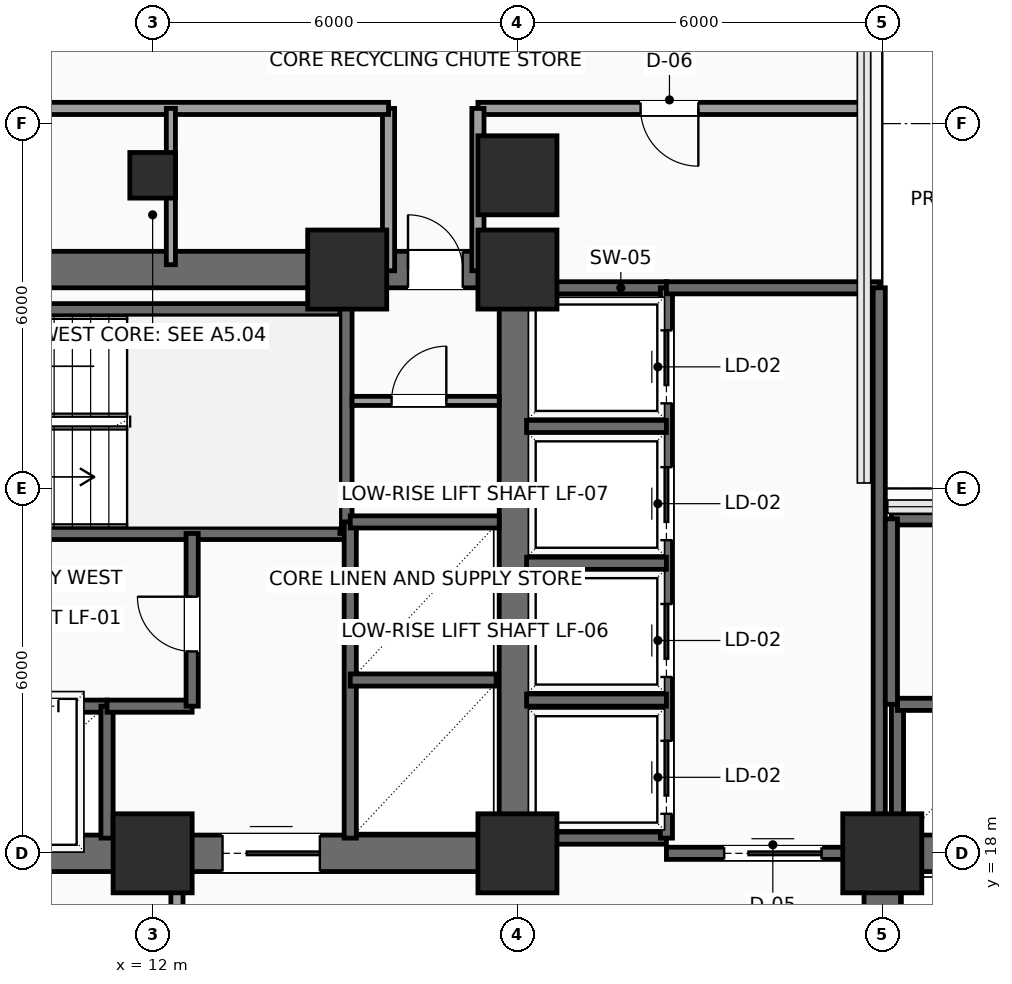
"""IFC4 building model, lengths in metres.
Left out: names, types, materials, properties, quantities, classifications, styles, units other than length and angle.
Written with IfcOpenShell. Run it as: python <this file> out.ifc"""

import sys

from ifc_helpers import new_model, si_unit, direction, frame, frame_2d, origin, origin_2d, place, context, subcontext, project, spatial, rectangle, hollow_rectangle, extrude, element, fill, save


model = new_model("IFC4")
c1 = context("Model", 3, precision=1e-05, world=origin(), true_north=direction((0.0, 1.0)))
c2 = subcontext(c1, "Body", "Model", "MODEL_VIEW")
j1 = project(units=[si_unit("LENGTHUNIT", "METRE"), si_unit("PLANEANGLEUNIT", "RADIAN")], contexts=[c1])
p1 = place(None, origin())
s1 = spatial("IfcSite", under=j1, at=p1, CompositionType="ELEMENT")
p2 = place(p1, origin())
s2 = spatial("IfcBuilding", under=s1, at=p2, CompositionType="ELEMENT")
p3 = place(p2, frame((0.0, 0.0, 63.6)))
s3 = spatial("IfcBuildingStorey", under=s2, at=p3, CompositionType="ELEMENT", Elevation=63.6)
for number, where, z_axis, x_axis in (
    (1, (12.0, 18.0, 0.0), (0.0, 0.0, 1.0), (1.0, 0.0, 0.0)),
    (2, (18.0, 18.0, 0.0), (0.0, 0.0, 1.0), (1.0, 0.0, 0.0)),
    (3, (15.2, 27.6, 0.0), (0.0, 0.0, 1.0), (1.0, 0.0, 0.0)),
    (4, (18.0, 27.6, 0.0), (0.0, 0.0, 1.0), (1.0, 0.0, 0.0)),
    (5, (24.0, 18.0, 0.0), (0.0, 0.0, 1.0), (1.0, 0.0, 0.0)),
):
    element("IfcColumn", number, at=place(p3, frame(where, z_axis=z_axis, x_axis=x_axis)), inside=s3, PredefinedType="COLUMN", context=c2, shape_type="SweptSolid", body=[
        extrude(rectangle(XDim=1.3, YDim=1.3, at=origin_2d()), origin(), (0.0, 0.0, 1.0), 3.9),
    ])
p4 = place(p3, frame((12.0, 29.15, 0.0), z_axis=(0.0, 0.0, 1.0), x_axis=(1.0, 0.0, 0.0)))
e6 = element("IfcColumn", 6, at=p4, inside=s3, PredefinedType="COLUMN", context=c2, shape_type="SweptSolid", body=[
    extrude(hollow_rectangle(XDim=0.75, YDim=0.75, WallThickness=0.035, InnerFilletRadius=0.035, OuterFilletRadius=0.05, at=origin_2d()), origin(), (0.0, 0.0, 1.0), 3.9),
])
p5 = place(p3, frame((18.0, 29.15, 0.0), z_axis=(0.0, 0.0, 1.0), x_axis=(1.0, 0.0, 0.0)))
e7 = element("IfcColumn", 7, at=p5, inside=s3, PredefinedType="COLUMN", context=c2, shape_type="SweptSolid", body=[
    extrude(rectangle(XDim=1.3, YDim=1.3, at=origin_2d()), origin(), (0.0, 0.0, 1.0), 3.9),
])
p6 = place(p3, frame((6.0, 18.0, 0.0), z_axis=(0.0, 0.0, 1.0), x_axis=(1.0, 0.0, 0.0)))
e8 = element("IfcWall", 8, at=p6, inside=s3, PredefinedType="SHEAR", context=c2, shape_type="SweptSolid", body=[
    extrude(rectangle(XDim=12.0, YDim=0.6, at=frame_2d((6.0, 0.0))), origin(), (0.0, 0.0, 1.0), 3.65),
])
p7 = place(p6, frame((7.15, 0.0, 0.0)))
e9 = element("IfcOpeningElement", 9, at=p7, cuts=e8, PredefinedType="OPENING", context=c2, shape_type="SweptSolid", body=[
    extrude(rectangle(XDim=1.6, YDim=2.3, at=frame_2d((0.8, 1.15))), frame((0.0, 0.31, 0.0), z_axis=(0.0, -1.0, 0.0), x_axis=(1.0, 0.0, 0.0)), (0.0, 0.0, 1.0), 0.62),
])
p8 = place(p3, frame((6.0, 27.6, 0.0), z_axis=(0.0, 0.0, 1.0), x_axis=(1.0, 0.0, 0.0)))
e10 = element("IfcWall", 10, at=p8, inside=s3, PredefinedType="SHEAR", context=c2, shape_type="SweptSolid", body=[
    extrude(rectangle(XDim=12.0, YDim=0.6, at=frame_2d((6.0, 0.0))), origin(), (0.0, 0.0, 1.0), 3.65),
])
p9 = place(p8, frame((10.2, 0.0, 0.0)))
e11 = element("IfcOpeningElement", 11, at=p9, cuts=e10, PredefinedType="OPENING", context=c2, shape_type="SweptSolid", body=[
    extrude(rectangle(XDim=0.9, YDim=2.15, at=frame_2d((0.45, 1.075))), frame((0.0, 0.31, 0.0), z_axis=(0.0, -1.0, 0.0), x_axis=(1.0, 0.0, 0.0)), (0.0, 0.0, 1.0), 0.62),
])
for number, where, z_axis, x_axis in (
    (12, (18.0, 18.0, 0.0), (0.0, 0.0, 1.0), (0.0, 1.0, 0.0)),
    (13, (24.0, 18.0, 0.0), (0.0, 0.0, 1.0), (1.0, 0.0, 0.0)),
):
    element("IfcWall", number, at=place(p3, frame(where, z_axis=z_axis, x_axis=x_axis)), inside=s3, PredefinedType="SHEAR", context=c2, shape_type="SweptSolid", body=[
        extrude(rectangle(XDim=9.6, YDim=0.6, at=frame_2d((4.8, 0.0))), origin(), (0.0, 0.0, 1.0), 3.65),
    ])
p10 = place(p3, frame((24.0, 6.0, 0.0), z_axis=(0.0, 0.0, 1.0), x_axis=(0.0, 1.0, 0.0)))
e14 = element("IfcWall", 14, at=p10, inside=s3, PredefinedType="SHEAR", context=c2, shape_type="SweptSolid", body=[
    extrude(rectangle(XDim=12.0, YDim=0.6, at=frame_2d((6.0, 0.0))), origin(), (0.0, 0.0, 1.0), 3.65),
])
p11 = place(p10, frame((7.15, 0.0, 0.0)))
e15 = element("IfcOpeningElement", 15, at=p11, cuts=e14, PredefinedType="OPENING", context=c2, shape_type="SweptSolid", body=[
    extrude(rectangle(XDim=1.6, YDim=2.3, at=frame_2d((0.8, 1.15))), frame((0.0, 0.31, 0.0), z_axis=(0.0, -1.0, 0.0), x_axis=(1.0, 0.0, 0.0)), (0.0, 0.0, 1.0), 0.62),
])
p12 = place(p3, frame((6.3, 23.26, 0.0), z_axis=(0.0, 0.0, 1.0), x_axis=(1.0, 0.0, 0.0)))
e16 = element("IfcWall", 16, at=p12, inside=s3, PredefinedType="SHEAR", context=c2, shape_type="SweptSolid", body=[
    extrude(rectangle(XDim=8.88, YDim=0.2, at=frame_2d((4.44, 0.0))), origin(), (0.0, 0.0, 1.0), 3.65),
])
p13 = place(p12, frame((0.35, 0.0, 0.0)))
e17 = element("IfcOpeningElement", 17, at=p13, cuts=e16, PredefinedType="OPENING", context=c2, shape_type="SweptSolid", body=[
    extrude(rectangle(XDim=1.1, YDim=2.2, at=frame_2d((0.55, 1.1))), frame((0.0, 0.11, 0.0), z_axis=(0.0, -1.0, 0.0), x_axis=(1.0, 0.0, 0.0)), (0.0, 0.0, 1.0), 0.22),
])
p14 = place(p3, frame((6.3, 26.94, 0.0), z_axis=(0.0, 0.0, 1.0), x_axis=(1.0, 0.0, 0.0)))
e18 = element("IfcWall", 18, at=p14, inside=s3, PredefinedType="SHEAR", context=c2, shape_type="SweptSolid", body=[
    extrude(rectangle(XDim=8.88, YDim=0.2, at=frame_2d((4.44, 0.0))), origin(), (0.0, 0.0, 1.0), 3.65),
])
p15 = place(p3, frame((15.18, 23.26, 0.0), z_axis=(0.0, 0.0, 1.0), x_axis=(0.0, 1.0, 0.0)))
e19 = element("IfcWall", 19, at=p15, inside=s3, PredefinedType="SHEAR", context=c2, shape_type="SweptSolid", body=[
    extrude(rectangle(XDim=4.04, YDim=0.2, at=frame_2d((2.02, 0.0))), origin(), (0.0, 0.0, 1.0), 3.65),
])
p16 = place(p3, frame((6.3, 20.42, 0.0), z_axis=(0.0, 0.0, 1.0), x_axis=(1.0, 0.0, 0.0)))
e20 = element("IfcWall", 20, at=p16, inside=s3, PredefinedType="SHEAR", context=c2, shape_type="SweptSolid", body=[
    extrude(rectangle(XDim=4.95, YDim=0.2, at=frame_2d((2.475, 0.0))), origin(), (0.0, 0.0, 1.0), 3.65),
])
p17 = place(p16, frame((0.65, 0.0, 0.0)))
e21 = element("IfcOpeningElement", 21, at=p17, cuts=e20, PredefinedType="OPENING", context=c2, shape_type="SweptSolid", body=[
    extrude(rectangle(XDim=1.1, YDim=2.2, at=frame_2d((0.55, 1.1))), frame((0.0, 0.11, 0.0), z_axis=(0.0, -1.0, 0.0), x_axis=(1.0, 0.0, 0.0)), (0.0, 0.0, 1.0), 0.22),
])
p18 = place(p16, frame((3.05, 0.0, 0.0)))
e22 = element("IfcOpeningElement", 22, at=p18, cuts=e20, PredefinedType="OPENING", context=c2, shape_type="SweptSolid", body=[
    extrude(rectangle(XDim=1.1, YDim=2.2, at=frame_2d((0.55, 1.1))), frame((0.0, 0.11, 0.0), z_axis=(0.0, -1.0, 0.0), x_axis=(1.0, 0.0, 0.0)), (0.0, 0.0, 1.0), 0.22),
])
p19 = place(p3, frame((11.25, 18.25, 0.0), z_axis=(0.0, 0.0, 1.0), x_axis=(0.0, 1.0, 0.0)))
e23 = element("IfcWall", 23, at=p19, inside=s3, PredefinedType="SHEAR", context=c2, shape_type="SweptSolid", body=[
    extrude(rectangle(XDim=2.17, YDim=0.2, at=frame_2d((1.085, 0.0))), origin(), (0.0, 0.0, 1.0), 3.65),
])
p20 = place(p3, frame((11.25, 20.42, 0.0), z_axis=(0.0, 0.0, 1.0), x_axis=(1.0, 0.0, 0.0)))
e24 = element("IfcWall", 24, at=p20, inside=s3, PredefinedType="SHEAR", context=c2, shape_type="SweptSolid", body=[
    extrude(rectangle(XDim=1.4, YDim=0.2, at=frame_2d((0.7, 0.0))), origin(), (0.0, 0.0, 1.0), 3.65),
])
p21 = place(p3, frame((12.65, 20.42, 0.0), z_axis=(0.0, 0.0, 1.0), x_axis=(0.0, 1.0, 0.0)))
e25 = element("IfcWall", 25, at=p21, inside=s3, PredefinedType="SHEAR", context=c2, shape_type="SweptSolid", body=[
    extrude(rectangle(XDim=2.84, YDim=0.2, at=frame_2d((1.42, 0.0))), origin(), (0.0, 0.0, 1.0), 3.65),
])
p22 = place(p21, frame((0.9, 0.0, 0.0)))
e26 = element("IfcOpeningElement", 26, at=p22, cuts=e25, PredefinedType="OPENING", context=c2, shape_type="SweptSolid", body=[
    extrude(rectangle(XDim=0.9, YDim=2.15, at=frame_2d((0.45, 1.075))), frame((0.0, 0.11, 0.0), z_axis=(0.0, -1.0, 0.0), x_axis=(1.0, 0.0, 0.0)), (0.0, 0.0, 1.0), 0.22),
])
p23 = place(p3, frame((15.25, 18.25, 0.0), z_axis=(0.0, 0.0, 1.0), x_axis=(0.0, 1.0, 0.0)))
e27 = element("IfcWall", 27, at=p23, inside=s3, PredefinedType="SHEAR", context=c2, shape_type="SweptSolid", body=[
    extrude(rectangle(XDim=5.2, YDim=0.2, at=frame_2d((2.6, 0.0))), origin(), (0.0, 0.0, 1.0), 3.65),
])
p24 = place(p3, frame((15.25, 20.85, 0.0), z_axis=(0.0, 0.0, 1.0), x_axis=(1.0, 0.0, 0.0)))
e28 = element("IfcWall", 28, at=p24, inside=s3, PredefinedType="SHEAR", context=c2, shape_type="SweptSolid", body=[
    extrude(rectangle(XDim=2.4, YDim=0.2, at=frame_2d((1.2, 0.0))), origin(), (0.0, 0.0, 1.0), 3.65),
])
p25 = place(p3, frame((15.25, 23.45, 0.0), z_axis=(0.0, 0.0, 1.0), x_axis=(1.0, 0.0, 0.0)))
e29 = element("IfcWall", 29, at=p25, inside=s3, PredefinedType="SHEAR", context=c2, shape_type="SweptSolid", body=[
    extrude(rectangle(XDim=2.45, YDim=0.2, at=frame_2d((1.225, 0.0))), origin(), (0.0, 0.0, 1.0), 3.65),
])
p26 = place(p3, frame((15.28, 25.44, 0.0), z_axis=(0.0, 0.0, 1.0), x_axis=(1.0, 0.0, 0.0)))
e30 = element("IfcWall", 30, at=p26, inside=s3, PredefinedType="PARTITIONING", context=c2, shape_type="SweptSolid", body=[
    extrude(rectangle(XDim=2.42, YDim=0.15, at=frame_2d((1.21, 0.0))), origin(), (0.0, 0.0, 1.0), 3.65),
])
p27 = place(p26, frame((0.65, 0.0, 0.0)))
e31 = element("IfcOpeningElement", 31, at=p27, cuts=e30, PredefinedType="OPENING", context=c2, shape_type="SweptSolid", body=[
    extrude(rectangle(XDim=0.9, YDim=2.15, at=frame_2d((0.45, 1.075))), frame((0.0, 0.085, 0.0), z_axis=(0.0, -1.0, 0.0), x_axis=(1.0, 0.0, 0.0)), (0.0, 0.0, 1.0), 0.17),
])
for number, where, z_axis, x_axis in (
    (32, (18.1, 27.3, 0.0), (0.0, 0.0, 1.0), (1.0, 0.0, 0.0)),
    (33, (18.1, 18.25, 0.0), (0.0, 0.0, 1.0), (1.0, 0.0, 0.0)),
):
    element("IfcWall", number, at=place(p3, frame(where, z_axis=z_axis, x_axis=x_axis)), inside=s3, PredefinedType="SHEAR", context=c2, shape_type="SweptSolid", body=[
        extrude(rectangle(XDim=2.35, YDim=0.2, at=frame_2d((1.175, 0.0))), origin(), (0.0, 0.0, 1.0), 3.65),
    ])
p28 = place(p3, frame((20.45, 18.25, 0.0), z_axis=(0.0, 0.0, 1.0), x_axis=(0.0, 1.0, 0.0)))
e34 = element("IfcWall", 34, at=p28, inside=s3, PredefinedType="SHEAR", context=c2, shape_type="SweptSolid", body=[
    extrude(rectangle(XDim=9.05, YDim=0.2, at=frame_2d((4.525, 0.0))), origin(), (0.0, 0.0, 1.0), 3.65),
])
p29 = place(p28, frame((0.4, 0.0, 0.0)))
e35 = element("IfcOpeningElement", 35, at=p29, cuts=e34, PredefinedType="OPENING", context=c2, shape_type="SweptSolid", body=[
    extrude(rectangle(XDim=1.2, YDim=2.2, at=frame_2d((0.6, 1.1))), frame((0.0, 0.11, 0.0), z_axis=(0.0, -1.0, 0.0), x_axis=(1.0, 0.0, 0.0)), (0.0, 0.0, 1.0), 0.22),
])
p30 = place(p28, frame((2.65, 0.0, 0.0)))
e36 = element("IfcOpeningElement", 36, at=p30, cuts=e34, PredefinedType="OPENING", context=c2, shape_type="SweptSolid", body=[
    extrude(rectangle(XDim=1.2, YDim=2.2, at=frame_2d((0.6, 1.1))), frame((0.0, 0.11, 0.0), z_axis=(0.0, -1.0, 0.0), x_axis=(1.0, 0.0, 0.0)), (0.0, 0.0, 1.0), 0.22),
])
p31 = place(p28, frame((4.9, 0.0, 0.0)))
e37 = element("IfcOpeningElement", 37, at=p31, cuts=e34, PredefinedType="OPENING", context=c2, shape_type="SweptSolid", body=[
    extrude(rectangle(XDim=1.2, YDim=2.2, at=frame_2d((0.6, 1.1))), frame((0.0, 0.11, 0.0), z_axis=(0.0, -1.0, 0.0), x_axis=(1.0, 0.0, 0.0)), (0.0, 0.0, 1.0), 0.22),
])
p32 = place(p28, frame((7.15, 0.0, 0.0)))
e38 = element("IfcOpeningElement", 38, at=p32, cuts=e34, PredefinedType="OPENING", context=c2, shape_type="SweptSolid", body=[
    extrude(rectangle(XDim=1.2, YDim=2.2, at=frame_2d((0.6, 1.1))), frame((0.0, 0.11, 0.0), z_axis=(0.0, -1.0, 0.0), x_axis=(1.0, 0.0, 0.0)), (0.0, 0.0, 1.0), 0.22),
])
for number, where, z_axis, x_axis in (
    (39, (18.15, 20.52, 0.0), (0.0, 0.0, 1.0), (1.0, 0.0, 0.0)),
    (40, (18.15, 22.77, 0.0), (0.0, 0.0, 1.0), (1.0, 0.0, 0.0)),
    (41, (18.15, 25.02, 0.0), (0.0, 0.0, 1.0), (1.0, 0.0, 0.0)),
):
    element("IfcWall", number, at=place(p3, frame(where, z_axis=z_axis, x_axis=x_axis)), inside=s3, PredefinedType="SHEAR", context=c2, shape_type="SweptSolid", body=[
        extrude(rectangle(XDim=2.3, YDim=0.2, at=frame_2d((1.15, 0.0))), origin(), (0.0, 0.0, 1.0), 3.65),
    ])
p33 = place(p3, frame((20.45, 18.0, 0.0), z_axis=(0.0, 0.0, 1.0), x_axis=(1.0, 0.0, 0.0)))
e42 = element("IfcWall", 42, at=p33, inside=s3, PredefinedType="SHEAR", context=c2, shape_type="SweptSolid", body=[
    extrude(rectangle(XDim=3.5, YDim=0.2, at=frame_2d((1.75, 0.0))), origin(), (0.0, 0.0, 1.0), 3.65),
])
p34 = place(p33, frame((0.95, 0.0, 0.0)))
e43 = element("IfcOpeningElement", 43, at=p34, cuts=e42, PredefinedType="OPENING", context=c2, shape_type="SweptSolid", body=[
    extrude(rectangle(XDim=1.6, YDim=2.3, at=frame_2d((0.8, 1.15))), frame((0.0, 0.11, 0.0), z_axis=(0.0, -1.0, 0.0), x_axis=(1.0, 0.0, 0.0)), (0.0, 0.0, 1.0), 0.22),
])
p35 = place(p3, frame((20.45, 27.3, 0.0), z_axis=(0.0, 0.0, 1.0), x_axis=(1.0, 0.0, 0.0)))
e44 = element("IfcWall", 44, at=p35, inside=s3, PredefinedType="SHEAR", context=c2, shape_type="SweptSolid", body=[
    extrude(rectangle(XDim=3.5, YDim=0.2, at=frame_2d((1.75, 0.0))), origin(), (0.0, 0.0, 1.0), 3.65),
])
p36 = place(p3, frame((23.95, 18.0, 0.0), z_axis=(0.0, 0.0, 1.0), x_axis=(0.0, 1.0, 0.0)))
e45 = element("IfcWall", 45, at=p36, inside=s3, PredefinedType="SHEAR", context=c2, shape_type="SweptSolid", body=[
    extrude(rectangle(XDim=9.3, YDim=0.2, at=frame_2d((4.65, 0.0))), origin(), (0.0, 0.0, 1.0), 3.65),
])
p37 = place(p3, frame((24.25, 18.1, 0.0), z_axis=(0.0, 0.0, 1.0), x_axis=(0.0, 1.0, 0.0)))
e46 = element("IfcWall", 46, at=p37, inside=s3, PredefinedType="SHEAR", context=c2, shape_type="SweptSolid", body=[
    extrude(rectangle(XDim=2.35, YDim=0.2, at=frame_2d((1.175, 0.0))), origin(), (0.0, 0.0, 1.0), 3.65),
])
p38 = place(p3, frame((24.25, 20.45, 0.0), z_axis=(0.0, 0.0, 1.0), x_axis=(1.0, 0.0, 0.0)))
e47 = element("IfcWall", 47, at=p38, inside=s3, PredefinedType="SHEAR", context=c2, shape_type="SweptSolid", body=[
    extrude(rectangle(XDim=9.05, YDim=0.2, at=frame_2d((4.525, 0.0))), origin(), (0.0, 0.0, 1.0), 3.65),
])
p39 = place(p3, frame((24.15, 23.5, 0.0), z_axis=(0.0, 0.0, 1.0), x_axis=(1.0, 0.0, 0.0)))
e48 = element("IfcWall", 48, at=p39, inside=s3, PredefinedType="SHEAR", context=c2, shape_type="SweptSolid", body=[
    extrude(rectangle(XDim=9.15, YDim=0.2, at=frame_2d((4.575, 0.0))), origin(), (0.0, 0.0, 1.0), 3.65),
])
p40 = place(p3, frame((24.15, 20.45, 0.0), z_axis=(0.0, 0.0, 1.0), x_axis=(0.0, 1.0, 0.0)))
e49 = element("IfcWall", 49, at=p40, inside=s3, PredefinedType="SHEAR", context=c2, shape_type="SweptSolid", body=[
    extrude(rectangle(XDim=3.05, YDim=0.2, at=frame_2d((1.525, 0.0))), origin(), (0.0, 0.0, 1.0), 3.65),
])
p41 = place(p3, frame((23.7, 30.25, 0.0), z_axis=(0.0, 0.0, 1.0), x_axis=(-1.0, 0.0, 0.0)))
e50 = element("IfcWall", 50, at=p41, inside=s3, PredefinedType="SOLIDWALL", context=c2, shape_type="SweptSolid", body=[
    extrude(rectangle(XDim=6.35, YDim=0.2, at=frame_2d((3.175, 0.0))), origin(), (0.0, 0.0, 1.0), 3.65),
])
p42 = place(p41, frame((2.725, 0.0, 0.0)))
e51 = element("IfcOpeningElement", 51, at=p42, cuts=e50, PredefinedType="OPENING", context=c2, shape_type="SweptSolid", body=[
    extrude(rectangle(XDim=0.95, YDim=2.15, at=frame_2d((0.475, 1.075))), frame((0.0, 0.11, 0.0), z_axis=(0.0, -1.0, 0.0), x_axis=(1.0, 0.0, 0.0)), (0.0, 0.0, 1.0), 0.22),
])
for number, where, z_axis, x_axis in (
    (52, (17.35, 30.25, 0.0), (0.0, 0.0, 1.0), (0.0, -1.0, 0.0)),
    (53, (15.88, 27.58, 0.0), (0.0, 0.0, 1.0), (0.0, 1.0, 0.0)),
):
    element("IfcWall", number, at=place(p3, frame(where, z_axis=z_axis, x_axis=x_axis)), inside=s3, PredefinedType="SOLIDWALL", context=c2, shape_type="SweptSolid", body=[
        extrude(rectangle(XDim=2.67, YDim=0.2, at=frame_2d((1.335, 0.0))), origin(), (0.0, 0.0, 1.0), 3.65),
    ])
p43 = place(p3, frame((15.88, 30.25, 0.0), z_axis=(0.0, 0.0, 1.0), x_axis=(-1.0, 0.0, 0.0)))
e54 = element("IfcWall", 54, at=p43, inside=s3, PredefinedType="SOLIDWALL", context=c2, shape_type="SweptSolid", body=[
    extrude(rectangle(XDim=10.63, YDim=0.2, at=frame_2d((5.315, 0.0))), origin(), (0.0, 0.0, 1.0), 3.65),
])
p44 = place(p43, frame((6.13, 0.0, 0.0)))
e55 = element("IfcOpeningElement", 55, at=p44, cuts=e54, PredefinedType="OPENING", context=c2, shape_type="SweptSolid", body=[
    extrude(rectangle(XDim=0.9, YDim=2.1, at=frame_2d((0.45, 1.05))), frame((0.0, 0.11, 0.0), z_axis=(0.0, -1.0, 0.0), x_axis=(1.0, 0.0, 0.0)), (0.0, 0.0, 1.0), 0.22),
])
p45 = place(p3, frame((12.4, 16.15, 0.0), z_axis=(0.0, 0.0, 1.0), x_axis=(0.0, 1.0, 0.0)))
e56 = element("IfcWall", 56, at=p45, inside=s3, PredefinedType="SOLIDWALL", context=c2, shape_type="SweptSolid", body=[
    extrude(rectangle(XDim=1.8, YDim=0.2, at=frame_2d((0.9, 0.0))), origin(), (0.0, 0.0, 1.0), 3.65),
])
p46 = place(p3, frame((12.3, 27.68, 0.0), z_axis=(0.0, 0.0, 1.0), x_axis=(0.0, 1.0, 0.0)))
e57 = element("IfcWall", 57, at=p46, inside=s3, PredefinedType="PARTITIONING", context=c2, shape_type="SweptSolid", body=[
    extrude(rectangle(XDim=2.57, YDim=0.15, at=frame_2d((1.285, 0.0))), origin(), (0.0, 0.0, 1.0), 2.992),
])
p47 = place(p7, origin())
e58 = element("IfcDoor", 58, at=p47, inside=s3, OperationType="DOUBLE_DOOR_SLIDING", PredefinedType="DOOR", context=c2, shape_type="SweptSolid", body=[
    extrude(rectangle(XDim=1.6, YDim=2.3, at=frame_2d((0.8, 1.15))), frame((0.0, 0.025, 0.0), z_axis=(0.0, -1.0, 0.0), x_axis=(1.0, 0.0, 0.0)), (0.0, 0.0, 1.0), 0.05),
])
fill(e9, e58)
p48 = place(p9, origin())
e59 = element("IfcDoor", 59, at=p48, inside=s3, OperationType="SINGLE_SWING_LEFT", PredefinedType="DOOR", context=c2, shape_type="SweptSolid", body=[
    extrude(rectangle(XDim=0.9, YDim=2.15, at=frame_2d((0.45, 1.075))), frame((0.0, 0.025, 0.0), z_axis=(0.0, -1.0, 0.0), x_axis=(1.0, 0.0, 0.0)), (0.0, 0.0, 1.0), 0.05),
])
fill(e11, e59)
p49 = place(p18, origin())
e60 = element("IfcDoor", 60, at=p49, inside=s3, OperationType="SLIDING_TO_LEFT", PredefinedType="DOOR", context=c2, shape_type="SweptSolid", body=[
    extrude(rectangle(XDim=1.1, YDim=2.2, at=frame_2d((0.55, 1.1))), frame((0.0, 0.025, 0.0), z_axis=(0.0, -1.0, 0.0), x_axis=(1.0, 0.0, 0.0)), (0.0, 0.0, 1.0), 0.05),
])
fill(e22, e60)
p50 = place(p22, origin())
e61 = element("IfcDoor", 61, at=p50, inside=s3, OperationType="SINGLE_SWING_RIGHT", PredefinedType="DOOR", context=c2, shape_type="SweptSolid", body=[
    extrude(rectangle(XDim=0.9, YDim=2.15, at=frame_2d((0.45, 1.075))), frame((0.0, 0.025, 0.0), z_axis=(0.0, -1.0, 0.0), x_axis=(1.0, 0.0, 0.0)), (0.0, 0.0, 1.0), 0.05),
])
fill(e26, e61)
p51 = place(p27, origin())
e62 = element("IfcDoor", 62, at=p51, inside=s3, OperationType="SINGLE_SWING_RIGHT", PredefinedType="DOOR", context=c2, shape_type="SweptSolid", body=[
    extrude(rectangle(XDim=0.9, YDim=2.15, at=frame_2d((0.45, 1.075))), frame((0.0, 0.025, 0.0), z_axis=(0.0, -1.0, 0.0), x_axis=(1.0, 0.0, 0.0)), (0.0, 0.0, 1.0), 0.05),
])
fill(e31, e62)
p52 = place(p29, origin())
e63 = element("IfcDoor", 63, at=p52, inside=s3, OperationType="SLIDING_TO_RIGHT", PredefinedType="DOOR", context=c2, shape_type="SweptSolid", body=[
    extrude(rectangle(XDim=1.2, YDim=2.2, at=frame_2d((0.6, 1.1))), frame((0.0, 0.025, 0.0), z_axis=(0.0, -1.0, 0.0), x_axis=(1.0, 0.0, 0.0)), (0.0, 0.0, 1.0), 0.05),
])
fill(e35, e63)
p53 = place(p30, origin())
e64 = element("IfcDoor", 64, at=p53, inside=s3, OperationType="SLIDING_TO_RIGHT", PredefinedType="DOOR", context=c2, shape_type="SweptSolid", body=[
    extrude(rectangle(XDim=1.2, YDim=2.2, at=frame_2d((0.6, 1.1))), frame((0.0, 0.025, 0.0), z_axis=(0.0, -1.0, 0.0), x_axis=(1.0, 0.0, 0.0)), (0.0, 0.0, 1.0), 0.05),
])
fill(e36, e64)
p54 = place(p31, origin())
e65 = element("IfcDoor", 65, at=p54, inside=s3, OperationType="SLIDING_TO_RIGHT", PredefinedType="DOOR", context=c2, shape_type="SweptSolid", body=[
    extrude(rectangle(XDim=1.2, YDim=2.2, at=frame_2d((0.6, 1.1))), frame((0.0, 0.025, 0.0), z_axis=(0.0, -1.0, 0.0), x_axis=(1.0, 0.0, 0.0)), (0.0, 0.0, 1.0), 0.05),
])
fill(e37, e65)
p55 = place(p32, origin())
e66 = element("IfcDoor", 66, at=p55, inside=s3, OperationType="SLIDING_TO_RIGHT", PredefinedType="DOOR", context=c2, shape_type="SweptSolid", body=[
    extrude(rectangle(XDim=1.2, YDim=2.2, at=frame_2d((0.6, 1.1))), frame((0.0, 0.025, 0.0), z_axis=(0.0, -1.0, 0.0), x_axis=(1.0, 0.0, 0.0)), (0.0, 0.0, 1.0), 0.05),
])
fill(e38, e66)
p56 = place(p34, origin())
e67 = element("IfcDoor", 67, at=p56, inside=s3, OperationType="DOUBLE_DOOR_SLIDING", PredefinedType="DOOR", context=c2, shape_type="SweptSolid", body=[
    extrude(rectangle(XDim=1.6, YDim=2.3, at=frame_2d((0.8, 1.15))), frame((0.0, 0.025, 0.0), z_axis=(0.0, -1.0, 0.0), x_axis=(1.0, 0.0, 0.0)), (0.0, 0.0, 1.0), 0.05),
])
fill(e43, e67)
p57 = place(p42, origin())
e68 = element("IfcDoor", 68, at=p57, inside=s3, OperationType="SINGLE_SWING_LEFT", PredefinedType="DOOR", context=c2, shape_type="SweptSolid", body=[
    extrude(rectangle(XDim=0.95, YDim=2.15, at=frame_2d((0.475, 1.075))), frame((0.0, 0.025, 0.0), z_axis=(0.0, -1.0, 0.0), x_axis=(1.0, 0.0, 0.0)), (0.0, 0.0, 1.0), 0.05),
])
fill(e51, e68)
save(model, sys.argv[1])
